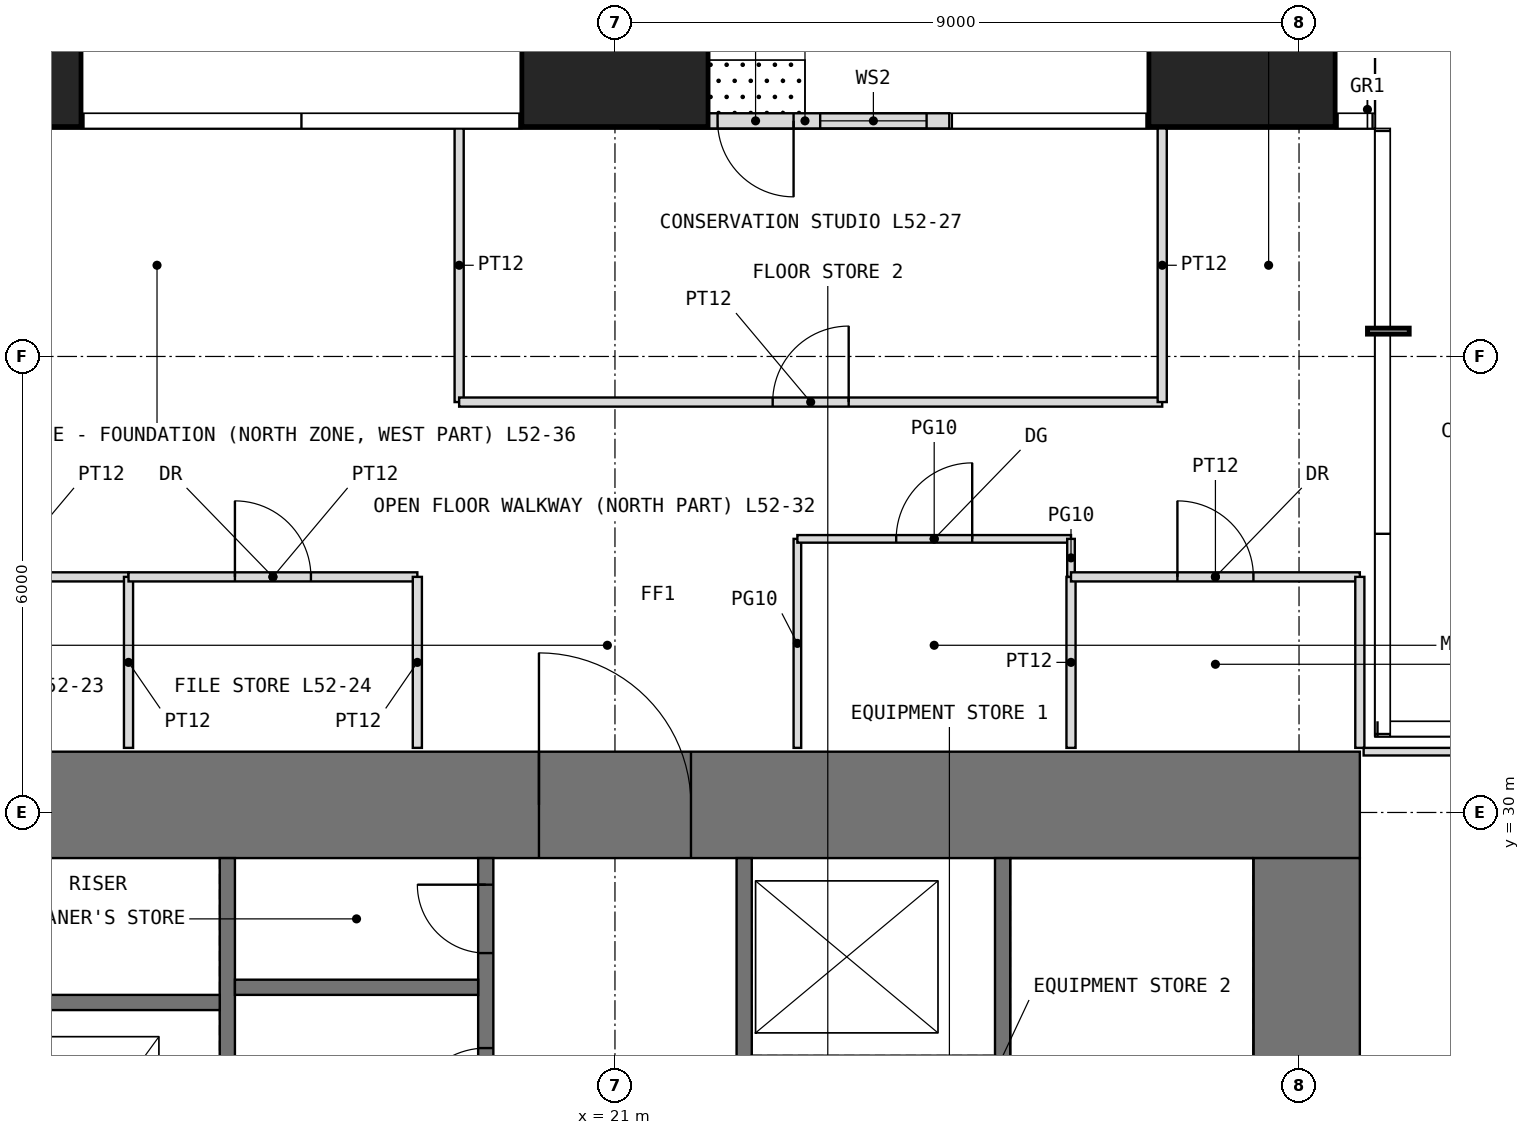
"""IFC4 building model, lengths in metres.
Left out: names, types, materials, properties, quantities, classifications, styles, units other than length and angle.
Written with IfcOpenShell. Run it as: python <this file> out.ifc"""

import sys

from ifc_helpers import new_model, si_unit, direction, frame, frame_2d, origin, origin_2d, place, context, subcontext, project, spatial, rectangle, extrude, element, fill, save


model = new_model("IFC4")
c1 = context("Model", 3, precision=1e-05, world=origin(), true_north=direction((0.0, 1.0)))
c2 = subcontext(c1, "Body", "Model", "MODEL_VIEW")
j1 = project(units=[si_unit("LENGTHUNIT", "METRE"), si_unit("PLANEANGLEUNIT", "RADIAN")], contexts=[c1])
p1 = place(None, origin())
s1 = spatial("IfcSite", under=j1, at=p1, CompositionType="ELEMENT")
p2 = place(p1, origin())
s2 = spatial("IfcBuilding", under=s1, at=p2, CompositionType="ELEMENT")
p3 = place(p2, frame((0.0, 0.0, 218.5)))
s3 = spatial("IfcBuildingStorey", under=s2, at=p3, CompositionType="ELEMENT", Elevation=218.5)
for number, where, z_axis, x_axis in (
    (1, (12.75, 40.25, 0.0), (0.0, 0.0, 1.0), (1.0, 0.0, 0.0)),
    (2, (21.0, 40.25, 0.0), (0.0, 0.0, 1.0), (1.0, 0.0, 0.0)),
    (3, (29.25, 40.25, 0.0), (0.0, 0.0, 1.0), (1.0, 0.0, 0.0)),
):
    element("IfcColumn", number, at=place(p3, frame(where, z_axis=z_axis, x_axis=x_axis)), inside=s3, PredefinedType="COLUMN", context=c2, shape_type="SweptSolid", body=[
        extrude(rectangle(XDim=2.45, YDim=2.45, at=origin_2d()), origin(), (0.0, 0.0, 1.0), 4.0),
    ])
p4 = place(p3, frame((25.4, 39.1, 0.0), z_axis=(0.0, 0.0, 1.0), x_axis=(-1.0, 0.0, 0.0)))
e4 = element("IfcWall", 4, at=p4, inside=s3, PredefinedType="USERDEFINED", context=c2, shape_type="SweptSolid", body=[
    extrude(rectangle(XDim=3.8, YDim=0.2, at=frame_2d((1.9, 0.0))), origin(), (0.0, 0.0, 1.0), 3.75),
])
p5 = place(p4, frame((2.05, 0.0, 0.0)))
e5 = element("IfcOpeningElement", 5, at=p5, cuts=e4, PredefinedType="OPENING", context=c2, shape_type="SweptSolid", body=[
    extrude(rectangle(XDim=1.0, YDim=2.4, at=frame_2d((0.5, 1.2))), frame((0.0, 0.11, 0.0), z_axis=(0.0, -1.0, 0.0), x_axis=(1.0, 0.0, 0.0)), (0.0, 0.0, 1.0), 0.22),
])
p6 = place(p4, frame((0.3, 0.0, 0.3)))
e6 = element("IfcOpeningElement", 6, at=p6, cuts=e4, PredefinedType="OPENING", context=c2, shape_type="SweptSolid", body=[
    extrude(rectangle(XDim=1.4, YDim=2.7, at=frame_2d((0.7, 1.35))), frame((0.0, 0.11, 0.0), z_axis=(0.0, -1.0, 0.0), x_axis=(1.0, 0.0, 0.0)), (0.0, 0.0, 1.0), 0.22),
])
p7 = place(p3, frame((11.2, 30.1, -0.05), z_axis=(0.0, 0.0, 1.0), x_axis=(1.0, 0.0, 0.0)))
e7 = element("IfcWall", 7, at=p7, inside=s3, PredefinedType="SHEAR", context=c2, shape_type="SweptSolid", body=[
    extrude(rectangle(XDim=19.6, YDim=1.4, at=frame_2d((9.8, 0.0))), origin(), (0.0, 0.0, 1.0), 4.0),
])
p8 = place(p7, frame((8.8, 0.0, 0.05)))
e8 = element("IfcOpeningElement", 8, at=p8, cuts=e7, PredefinedType="OPENING", context=c2, shape_type="SweptSolid", body=[
    extrude(rectangle(XDim=2.0, YDim=2.2, at=frame_2d((1.0, 1.1))), frame((0.0, 0.71, 0.0), z_axis=(0.0, -1.0, 0.0), x_axis=(1.0, 0.0, 0.0)), (0.0, 0.0, 1.0), 1.42),
])
p9 = place(p3, frame((30.1, 12.6, -0.05), z_axis=(0.0, 0.0, 1.0), x_axis=(0.0, 1.0, 0.0)))
e9 = element("IfcWall", 9, at=p9, inside=s3, PredefinedType="SHEAR", context=c2, shape_type="SweptSolid", body=[
    extrude(rectangle(XDim=16.8, YDim=1.4, at=frame_2d((8.4, 0.0))), origin(), (0.0, 0.0, 1.0), 4.0),
])
p10 = place(p9, frame((5.9, 0.0, 0.05)))
e10 = element("IfcOpeningElement", 10, at=p10, cuts=e9, PredefinedType="OPENING", context=c2, shape_type="SweptSolid", body=[
    extrude(rectangle(XDim=1.0, YDim=2.2, at=frame_2d((0.5, 1.1))), frame((0.0, 0.71, 0.0), z_axis=(0.0, -1.0, 0.0), x_axis=(1.0, 0.0, 0.0)), (0.0, 0.0, 1.0), 1.42),
])
p11 = place(p3, frame((15.9, 12.6, -0.05), z_axis=(0.0, 0.0, 1.0), x_axis=(0.0, 1.0, 0.0)))
e11 = element("IfcWall", 11, at=p11, inside=s3, PredefinedType="SHEAR", context=c2, shape_type="SweptSolid", body=[
    extrude(rectangle(XDim=16.8, YDim=0.2, at=frame_2d((8.4, 0.0))), origin(), (0.0, 0.0, 1.0), 4.0),
])
p12 = place(p11, frame((8.9, 0.0, 0.05)))
e12 = element("IfcOpeningElement", 12, at=p12, cuts=e11, PredefinedType="OPENING", context=c2, shape_type="SweptSolid", body=[
    extrude(rectangle(XDim=1.0, YDim=2.2, at=frame_2d((0.5, 1.1))), frame((0.0, 0.11, 0.0), z_axis=(0.0, -1.0, 0.0), x_axis=(1.0, 0.0, 0.0)), (0.0, 0.0, 1.0), 0.22),
])
p13 = place(p3, frame((19.3, 12.6, -0.05), z_axis=(0.0, 0.0, 1.0), x_axis=(0.0, 1.0, 0.0)))
e13 = element("IfcWall", 13, at=p13, inside=s3, PredefinedType="SHEAR", context=c2, shape_type="SweptSolid", body=[
    extrude(rectangle(XDim=16.8, YDim=0.2, at=frame_2d((8.4, 0.0))), origin(), (0.0, 0.0, 1.0), 4.0),
])
p14 = place(p13, frame((8.7, 0.0, 0.05)))
e14 = element("IfcOpeningElement", 14, at=p14, cuts=e13, PredefinedType="OPENING", context=c2, shape_type="SweptSolid", body=[
    extrude(rectangle(XDim=1.0, YDim=2.2, at=frame_2d((0.5, 1.1))), frame((0.0, 0.11, 0.0), z_axis=(0.0, -1.0, 0.0), x_axis=(1.0, 0.0, 0.0)), (0.0, 0.0, 1.0), 0.22),
])
p15 = place(p13, frame((10.85, 0.0, 0.05)))
e15 = element("IfcOpeningElement", 15, at=p15, cuts=e13, PredefinedType="OPENING", context=c2, shape_type="SweptSolid", body=[
    extrude(rectangle(XDim=0.9, YDim=2.2, at=frame_2d((0.45, 1.1))), frame((0.0, 0.11, 0.0), z_axis=(0.0, -1.0, 0.0), x_axis=(1.0, 0.0, 0.0)), (0.0, 0.0, 1.0), 0.22),
])
p16 = place(p13, frame((13.3, 0.0, 0.05)))
e16 = element("IfcOpeningElement", 16, at=p16, cuts=e13, PredefinedType="OPENING", context=c2, shape_type="SweptSolid", body=[
    extrude(rectangle(XDim=1.0, YDim=2.2, at=frame_2d((0.5, 1.1))), frame((0.0, 0.11, 0.0), z_axis=(0.0, -1.0, 0.0), x_axis=(1.0, 0.0, 0.0)), (0.0, 0.0, 1.0), 0.22),
])
p17 = place(p13, frame((15.55, 0.0, 0.05)))
e17 = element("IfcOpeningElement", 17, at=p17, cuts=e13, PredefinedType="OPENING", context=c2, shape_type="SweptSolid", body=[
    extrude(rectangle(XDim=0.9, YDim=2.2, at=frame_2d((0.45, 1.1))), frame((0.0, 0.11, 0.0), z_axis=(0.0, -1.0, 0.0), x_axis=(1.0, 0.0, 0.0)), (0.0, 0.0, 1.0), 0.22),
])
p18 = place(p13, frame((0.75, 0.0, 0.05)))
e18 = element("IfcOpeningElement", 18, at=p18, cuts=e13, PredefinedType="OPENING", context=c2, shape_type="SweptSolid", body=[
    extrude(rectangle(XDim=1.1, YDim=2.2, at=frame_2d((0.55, 1.1))), frame((0.0, 0.11, 0.0), z_axis=(0.0, -1.0, 0.0), x_axis=(1.0, 0.0, 0.0)), (0.0, 0.0, 1.0), 0.22),
])
p19 = place(p13, frame((3.55, 0.0, 0.05)))
e19 = element("IfcOpeningElement", 19, at=p19, cuts=e13, PredefinedType="OPENING", context=c2, shape_type="SweptSolid", body=[
    extrude(rectangle(XDim=1.1, YDim=2.2, at=frame_2d((0.55, 1.1))), frame((0.0, 0.11, 0.0), z_axis=(0.0, -1.0, 0.0), x_axis=(1.0, 0.0, 0.0)), (0.0, 0.0, 1.0), 0.22),
])
p20 = place(p13, frame((6.35, 0.0, 0.05)))
e20 = element("IfcOpeningElement", 20, at=p20, cuts=e13, PredefinedType="OPENING", context=c2, shape_type="SweptSolid", body=[
    extrude(rectangle(XDim=1.1, YDim=2.2, at=frame_2d((0.55, 1.1))), frame((0.0, 0.11, 0.0), z_axis=(0.0, -1.0, 0.0), x_axis=(1.0, 0.0, 0.0)), (0.0, 0.0, 1.0), 0.22),
])
p21 = place(p3, frame((22.7, 12.6, -0.05), z_axis=(0.0, 0.0, 1.0), x_axis=(0.0, 1.0, 0.0)))
e21 = element("IfcWall", 21, at=p21, inside=s3, PredefinedType="SHEAR", context=c2, shape_type="SweptSolid", body=[
    extrude(rectangle(XDim=16.8, YDim=0.2, at=frame_2d((8.4, 0.0))), origin(), (0.0, 0.0, 1.0), 4.0),
])
p22 = place(p21, frame((3.05, 0.0, 0.05)))
e22 = element("IfcOpeningElement", 22, at=p22, cuts=e21, PredefinedType="OPENING", context=c2, shape_type="SweptSolid", body=[
    extrude(rectangle(XDim=0.9, YDim=2.2, at=frame_2d((0.45, 1.1))), frame((0.0, 0.11, 0.0), z_axis=(0.0, -1.0, 0.0), x_axis=(1.0, 0.0, 0.0)), (0.0, 0.0, 1.0), 0.22),
])
p23 = place(p21, frame((7.1, 0.0, 0.05)))
e23 = element("IfcOpeningElement", 23, at=p23, cuts=e21, PredefinedType="OPENING", context=c2, shape_type="SweptSolid", body=[
    extrude(rectangle(XDim=1.0, YDim=2.2, at=frame_2d((0.5, 1.1))), frame((0.0, 0.11, 0.0), z_axis=(0.0, -1.0, 0.0), x_axis=(1.0, 0.0, 0.0)), (0.0, 0.0, 1.0), 0.22),
])
p24 = place(p21, frame((1.55, 0.0, 0.05)))
e24 = element("IfcOpeningElement", 24, at=p24, cuts=e21, PredefinedType="OPENING", context=c2, shape_type="SweptSolid", body=[
    extrude(rectangle(XDim=0.9, YDim=2.2, at=frame_2d((0.45, 1.1))), frame((0.0, 0.11, 0.0), z_axis=(0.0, -1.0, 0.0), x_axis=(1.0, 0.0, 0.0)), (0.0, 0.0, 1.0), 0.22),
])
p25 = place(p21, frame((4.95, 0.0, 0.05)))
e25 = element("IfcOpeningElement", 25, at=p25, cuts=e21, PredefinedType="OPENING", context=c2, shape_type="SweptSolid", body=[
    extrude(rectangle(XDim=0.9, YDim=2.2, at=frame_2d((0.45, 1.1))), frame((0.0, 0.11, 0.0), z_axis=(0.0, -1.0, 0.0), x_axis=(1.0, 0.0, 0.0)), (0.0, 0.0, 1.0), 0.22),
])
p26 = place(p21, frame((9.4, 0.0, 0.05)))
e26 = element("IfcOpeningElement", 26, at=p26, cuts=e21, PredefinedType="OPENING", context=c2, shape_type="SweptSolid", body=[
    extrude(rectangle(XDim=1.0, YDim=2.2, at=frame_2d((0.5, 1.1))), frame((0.0, 0.11, 0.0), z_axis=(0.0, -1.0, 0.0), x_axis=(1.0, 0.0, 0.0)), (0.0, 0.0, 1.0), 0.22),
])
p27 = place(p21, frame((12.2, 0.0, 0.05)))
e27 = element("IfcOpeningElement", 27, at=p27, cuts=e21, PredefinedType="OPENING", context=c2, shape_type="SweptSolid", body=[
    extrude(rectangle(XDim=1.0, YDim=2.2, at=frame_2d((0.5, 1.1))), frame((0.0, 0.11, 0.0), z_axis=(0.0, -1.0, 0.0), x_axis=(1.0, 0.0, 0.0)), (0.0, 0.0, 1.0), 0.22),
])
p28 = place(p3, frame((26.1, 12.6, -0.05), z_axis=(0.0, 0.0, 1.0), x_axis=(0.0, 1.0, 0.0)))
e28 = element("IfcWall", 28, at=p28, inside=s3, PredefinedType="SHEAR", context=c2, shape_type="SweptSolid", body=[
    extrude(rectangle(XDim=16.8, YDim=0.2, at=frame_2d((8.4, 0.0))), origin(), (0.0, 0.0, 1.0), 4.0),
])
p29 = place(p28, frame((6.9, 0.0, 0.05)))
e29 = element("IfcOpeningElement", 29, at=p29, cuts=e28, PredefinedType="OPENING", context=c2, shape_type="SweptSolid", body=[
    extrude(rectangle(XDim=1.0, YDim=2.2, at=frame_2d((0.5, 1.1))), frame((0.0, 0.11, 0.0), z_axis=(0.0, -1.0, 0.0), x_axis=(1.0, 0.0, 0.0)), (0.0, 0.0, 1.0), 0.22),
])
for number, where, z_axis, x_axis in (
    (30, (12.6, 27.5, -0.05), (0.0, 0.0, 1.0), (1.0, 0.0, 0.0)),
    (31, (16.0, 27.7, -0.05), (0.0, 0.0, 1.0), (1.0, 0.0, 0.0)),
):
    element("IfcWall", number, at=place(p3, frame(where, z_axis=z_axis, x_axis=x_axis)), inside=s3, PredefinedType="SHEAR", context=c2, shape_type="SweptSolid", body=[
        extrude(rectangle(XDim=3.2, YDim=0.2, at=frame_2d((1.6, 0.0))), origin(), (0.0, 0.0, 1.0), 4.0),
    ])
p30 = place(p3, frame((11.2, 33.1, 0.0), z_axis=(0.0, 0.0, 1.0), x_axis=(1.0, 0.0, 0.0)))
e32 = element("IfcWall", 32, at=p30, inside=s3, PredefinedType="PARTITIONING", context=c2, shape_type="SweptSolid", body=[
    extrude(rectangle(XDim=3.4, YDim=0.12, at=frame_2d((1.7, 0.0))), origin(), (0.0, 0.0, 1.0), 3.75),
])
p31 = place(p30, frame((1.2, 0.0, 0.0)))
e33 = element("IfcOpeningElement", 33, at=p31, cuts=e32, PredefinedType="OPENING", context=c2, shape_type="SweptSolid", body=[
    extrude(rectangle(XDim=1.0, YDim=2.2, at=frame_2d((0.5, 1.1))), frame((0.0, 0.07, 0.0), z_axis=(0.0, -1.0, 0.0), x_axis=(1.0, 0.0, 0.0)), (0.0, 0.0, 1.0), 0.14),
])
p32 = place(p3, frame((14.6, 30.85, 0.0), z_axis=(0.0, 0.0, 1.0), x_axis=(0.0, 1.0, 0.0)))
e34 = element("IfcWall", 34, at=p32, inside=s3, PredefinedType="PARTITIONING", context=c2, shape_type="SweptSolid", body=[
    extrude(rectangle(XDim=2.25, YDim=0.12, at=frame_2d((1.125, 0.0))), origin(), (0.0, 0.0, 1.0), 3.75),
])
p33 = place(p3, frame((14.6, 33.1, 0.0), z_axis=(0.0, 0.0, 1.0), x_axis=(1.0, 0.0, 0.0)))
e35 = element("IfcWall", 35, at=p33, inside=s3, PredefinedType="PARTITIONING", context=c2, shape_type="SweptSolid", body=[
    extrude(rectangle(XDim=3.8, YDim=0.12, at=frame_2d((1.9, 0.0))), origin(), (0.0, 0.0, 1.0), 3.75),
])
p34 = place(p33, frame((1.4, 0.0, 0.0)))
e36 = element("IfcOpeningElement", 36, at=p34, cuts=e35, PredefinedType="OPENING", context=c2, shape_type="SweptSolid", body=[
    extrude(rectangle(XDim=1.0, YDim=2.2, at=frame_2d((0.5, 1.1))), frame((0.0, 0.07, 0.0), z_axis=(0.0, -1.0, 0.0), x_axis=(1.0, 0.0, 0.0)), (0.0, 0.0, 1.0), 0.14),
])
p35 = place(p3, frame((18.4, 30.85, 0.0), z_axis=(0.0, 0.0, 1.0), x_axis=(0.0, 1.0, 0.0)))
e37 = element("IfcWall", 37, at=p35, inside=s3, PredefinedType="PARTITIONING", context=c2, shape_type="SweptSolid", body=[
    extrude(rectangle(XDim=2.25, YDim=0.12, at=frame_2d((1.125, 0.0))), origin(), (0.0, 0.0, 1.0), 3.75),
])
p36 = place(p3, frame((18.95, 35.4, 0.0), z_axis=(0.0, 0.0, 1.0), x_axis=(0.0, 1.0, 0.0)))
e38 = element("IfcWall", 38, at=p36, inside=s3, PredefinedType="PARTITIONING", context=c2, shape_type="SweptSolid", body=[
    extrude(rectangle(XDim=3.6, YDim=0.12, at=frame_2d((1.8, 0.0))), origin(), (0.0, 0.0, 1.0), 3.75),
])
p37 = place(p3, frame((18.95, 35.4, 0.0), z_axis=(0.0, 0.0, 1.0), x_axis=(1.0, 0.0, 0.0)))
e39 = element("IfcWall", 39, at=p37, inside=s3, PredefinedType="PARTITIONING", context=c2, shape_type="SweptSolid", body=[
    extrude(rectangle(XDim=9.25, YDim=0.12, at=frame_2d((4.625, 0.0))), origin(), (0.0, 0.0, 1.0), 3.75),
])
p38 = place(p37, frame((4.125, 0.0, 0.0)))
e40 = element("IfcOpeningElement", 40, at=p38, cuts=e39, PredefinedType="OPENING", context=c2, shape_type="SweptSolid", body=[
    extrude(rectangle(XDim=1.0, YDim=2.2, at=frame_2d((0.5, 1.1))), frame((0.0, 0.07, 0.0), z_axis=(0.0, -1.0, 0.0), x_axis=(1.0, 0.0, 0.0)), (0.0, 0.0, 1.0), 0.14),
])
p39 = place(p3, frame((23.4, 30.85, 0.0), z_axis=(0.0, 0.0, 1.0), x_axis=(0.0, 1.0, 0.0)))
e41 = element("IfcWall", 41, at=p39, inside=s3, PredefinedType="PARTITIONING", context=c2, shape_type="SweptSolid", body=[
    extrude(rectangle(XDim=2.75, YDim=0.1, at=frame_2d((1.375, 0.0))), origin(), (0.0, 0.0, 1.0), 3.75),
])
p40 = place(p3, frame((23.4, 33.6, 0.0), z_axis=(0.0, 0.0, 1.0), x_axis=(1.0, 0.0, 0.0)))
e42 = element("IfcWall", 42, at=p40, inside=s3, PredefinedType="PARTITIONING", context=c2, shape_type="SweptSolid", body=[
    extrude(rectangle(XDim=3.6, YDim=0.1, at=frame_2d((1.8, 0.0))), origin(), (0.0, 0.0, 1.0), 3.75),
])
p41 = place(p40, frame((1.3, 0.0, 0.0)))
e43 = element("IfcOpeningElement", 43, at=p41, cuts=e42, PredefinedType="OPENING", context=c2, shape_type="SweptSolid", body=[
    extrude(rectangle(XDim=1.0, YDim=2.4, at=frame_2d((0.5, 1.2))), frame((0.0, 0.06, 0.0), z_axis=(0.0, -1.0, 0.0), x_axis=(1.0, 0.0, 0.0)), (0.0, 0.0, 1.0), 0.12),
])
p42 = place(p3, frame((27.0, 30.85, 0.0), z_axis=(0.0, 0.0, 1.0), x_axis=(0.0, 1.0, 0.0)))
e44 = element("IfcWall", 44, at=p42, inside=s3, PredefinedType="PARTITIONING", context=c2, shape_type="SweptSolid", body=[
    extrude(rectangle(XDim=2.25, YDim=0.12, at=frame_2d((1.125, 0.0))), origin(), (0.0, 0.0, 1.0), 3.75),
])
p43 = place(p3, frame((27.0, 33.1, 0.0), z_axis=(0.0, 0.0, 1.0), x_axis=(0.0, 1.0, 0.0)))
e45 = element("IfcWall", 45, at=p43, inside=s3, PredefinedType="PARTITIONING", context=c2, shape_type="SweptSolid", body=[
    extrude(rectangle(XDim=0.5, YDim=0.1, at=frame_2d((0.25, 0.0))), origin(), (0.0, 0.0, 1.0), 3.75),
])
p44 = place(p3, frame((27.0, 33.1, 0.0), z_axis=(0.0, 0.0, 1.0), x_axis=(1.0, 0.0, 0.0)))
e46 = element("IfcWall", 46, at=p44, inside=s3, PredefinedType="PARTITIONING", context=c2, shape_type="SweptSolid", body=[
    extrude(rectangle(XDim=3.8, YDim=0.12, at=frame_2d((1.9, 0.0))), origin(), (0.0, 0.0, 1.0), 3.75),
])
p45 = place(p44, frame((1.4, 0.0, 0.0)))
e47 = element("IfcOpeningElement", 47, at=p45, cuts=e46, PredefinedType="OPENING", context=c2, shape_type="SweptSolid", body=[
    extrude(rectangle(XDim=1.0, YDim=2.2, at=frame_2d((0.5, 1.1))), frame((0.0, 0.07, 0.0), z_axis=(0.0, -1.0, 0.0), x_axis=(1.0, 0.0, 0.0)), (0.0, 0.0, 1.0), 0.14),
])
p46 = place(p3, frame((28.2, 35.4, 0.0), z_axis=(0.0, 0.0, 1.0), x_axis=(0.0, 1.0, 0.0)))
e48 = element("IfcWall", 48, at=p46, inside=s3, PredefinedType="PARTITIONING", context=c2, shape_type="SweptSolid", body=[
    extrude(rectangle(XDim=3.6, YDim=0.12, at=frame_2d((1.8, 0.0))), origin(), (0.0, 0.0, 1.0), 3.75),
])
p47 = place(p3, frame((30.8, 30.85, 0.0), z_axis=(0.0, 0.0, 1.0), x_axis=(0.0, 1.0, 0.0)))
e49 = element("IfcWall", 49, at=p47, inside=s3, PredefinedType="PARTITIONING", context=c2, shape_type="SweptSolid", body=[
    extrude(rectangle(XDim=2.25, YDim=0.12, at=frame_2d((1.125, 0.0))), origin(), (0.0, 0.0, 1.0), 3.75),
])
p48 = place(p3, frame((30.85, 30.8, 0.0), z_axis=(0.0, 0.0, 1.0), x_axis=(1.0, 0.0, 0.0)))
e50 = element("IfcWall", 50, at=p48, inside=s3, PredefinedType="PARTITIONING", context=c2, shape_type="SweptSolid", body=[
    extrude(rectangle(XDim=4.95, YDim=0.1, at=frame_2d((2.475, 0.0))), origin(), (0.0, 0.0, 1.0), 3.75),
])
p49 = place(p5, origin())
e51 = element("IfcDoor", 51, at=p49, inside=s3, OperationType="SINGLE_SWING_LEFT", PredefinedType="DOOR", context=c2, shape_type="SweptSolid", body=[
    extrude(rectangle(XDim=1.0, YDim=2.4, at=frame_2d((0.5, 1.2))), frame((0.0, 0.025, 0.0), z_axis=(0.0, -1.0, 0.0), x_axis=(1.0, 0.0, 0.0)), (0.0, 0.0, 1.0), 0.05),
])
fill(e5, e51)
p50 = place(p6, origin())
e52 = element("IfcWindow", 52, at=p50, inside=s3, PartitioningType="SINGLE_PANEL", PredefinedType="WINDOW", context=c2, shape_type="SweptSolid", body=[
    extrude(rectangle(XDim=1.4, YDim=2.7, at=frame_2d((0.7, 1.35))), frame((0.0, 0.03, 0.0), z_axis=(0.0, -1.0, 0.0), x_axis=(1.0, 0.0, 0.0)), (0.0, 0.0, 1.0), 0.06),
])
fill(e6, e52)
p51 = place(p8, origin())
e53 = element("IfcDoor", 53, at=p51, inside=s3, OperationType="DOUBLE_DOOR_SINGLE_SWING", PredefinedType="DOOR", context=c2, shape_type="SweptSolid", body=[
    extrude(rectangle(XDim=2.0, YDim=2.2, at=frame_2d((1.0, 1.1))), frame((0.0, 0.025, 0.0), z_axis=(0.0, -1.0, 0.0), x_axis=(1.0, 0.0, 0.0)), (0.0, 0.0, 1.0), 0.05),
])
fill(e8, e53)
p52 = place(p16, origin())
e54 = element("IfcDoor", 54, at=p52, inside=s3, OperationType="SINGLE_SWING_LEFT", PredefinedType="DOOR", context=c2, shape_type="SweptSolid", body=[
    extrude(rectangle(XDim=1.0, YDim=2.2, at=frame_2d((0.5, 1.1))), frame((0.0, 0.025, 0.0), z_axis=(0.0, -1.0, 0.0), x_axis=(1.0, 0.0, 0.0)), (0.0, 0.0, 1.0), 0.05),
])
fill(e16, e54)
p53 = place(p17, origin())
e55 = element("IfcDoor", 55, at=p53, inside=s3, OperationType="SINGLE_SWING_RIGHT", PredefinedType="DOOR", context=c2, shape_type="SweptSolid", body=[
    extrude(rectangle(XDim=0.9, YDim=2.2, at=frame_2d((0.45, 1.1))), frame((0.0, 0.025, 0.0), z_axis=(0.0, -1.0, 0.0), x_axis=(1.0, 0.0, 0.0)), (0.0, 0.0, 1.0), 0.05),
])
fill(e17, e55)
p54 = place(p34, origin())
e56 = element("IfcDoor", 56, at=p54, inside=s3, OperationType="SINGLE_SWING_LEFT", PredefinedType="DOOR", context=c2, shape_type="SweptSolid", body=[
    extrude(rectangle(XDim=1.0, YDim=2.2, at=frame_2d((0.5, 1.1))), frame((0.0, 0.025, 0.0), z_axis=(0.0, -1.0, 0.0), x_axis=(1.0, 0.0, 0.0)), (0.0, 0.0, 1.0), 0.05),
])
fill(e36, e56)
p55 = place(p41, origin())
e57 = element("IfcDoor", 57, at=p55, inside=s3, OperationType="SINGLE_SWING_RIGHT", PredefinedType="DOOR", context=c2, shape_type="SweptSolid", body=[
    extrude(rectangle(XDim=1.0, YDim=2.4, at=frame_2d((0.5, 1.2))), frame((0.0, 0.025, 0.0), z_axis=(0.0, -1.0, 0.0), x_axis=(1.0, 0.0, 0.0)), (0.0, 0.0, 1.0), 0.05),
])
fill(e43, e57)
p56 = place(p45, origin())
e58 = element("IfcDoor", 58, at=p56, inside=s3, OperationType="SINGLE_SWING_LEFT", PredefinedType="DOOR", context=c2, shape_type="SweptSolid", body=[
    extrude(rectangle(XDim=1.0, YDim=2.2, at=frame_2d((0.5, 1.1))), frame((0.0, 0.025, 0.0), z_axis=(0.0, -1.0, 0.0), x_axis=(1.0, 0.0, 0.0)), (0.0, 0.0, 1.0), 0.05),
])
fill(e47, e58)
p57 = place(p38, origin())
e59 = element("IfcDoor", 59, at=p57, inside=s3, OperationType="SINGLE_SWING_RIGHT", PredefinedType="DOOR", context=c2, shape_type="SweptSolid", body=[
    extrude(rectangle(XDim=1.0, YDim=2.2, at=frame_2d((0.5, 1.1))), frame((0.0, 0.025, 0.0), z_axis=(0.0, -1.0, 0.0), x_axis=(1.0, 0.0, 0.0)), (0.0, 0.0, 1.0), 0.05),
])
fill(e40, e59)
save(model, sys.argv[1])
